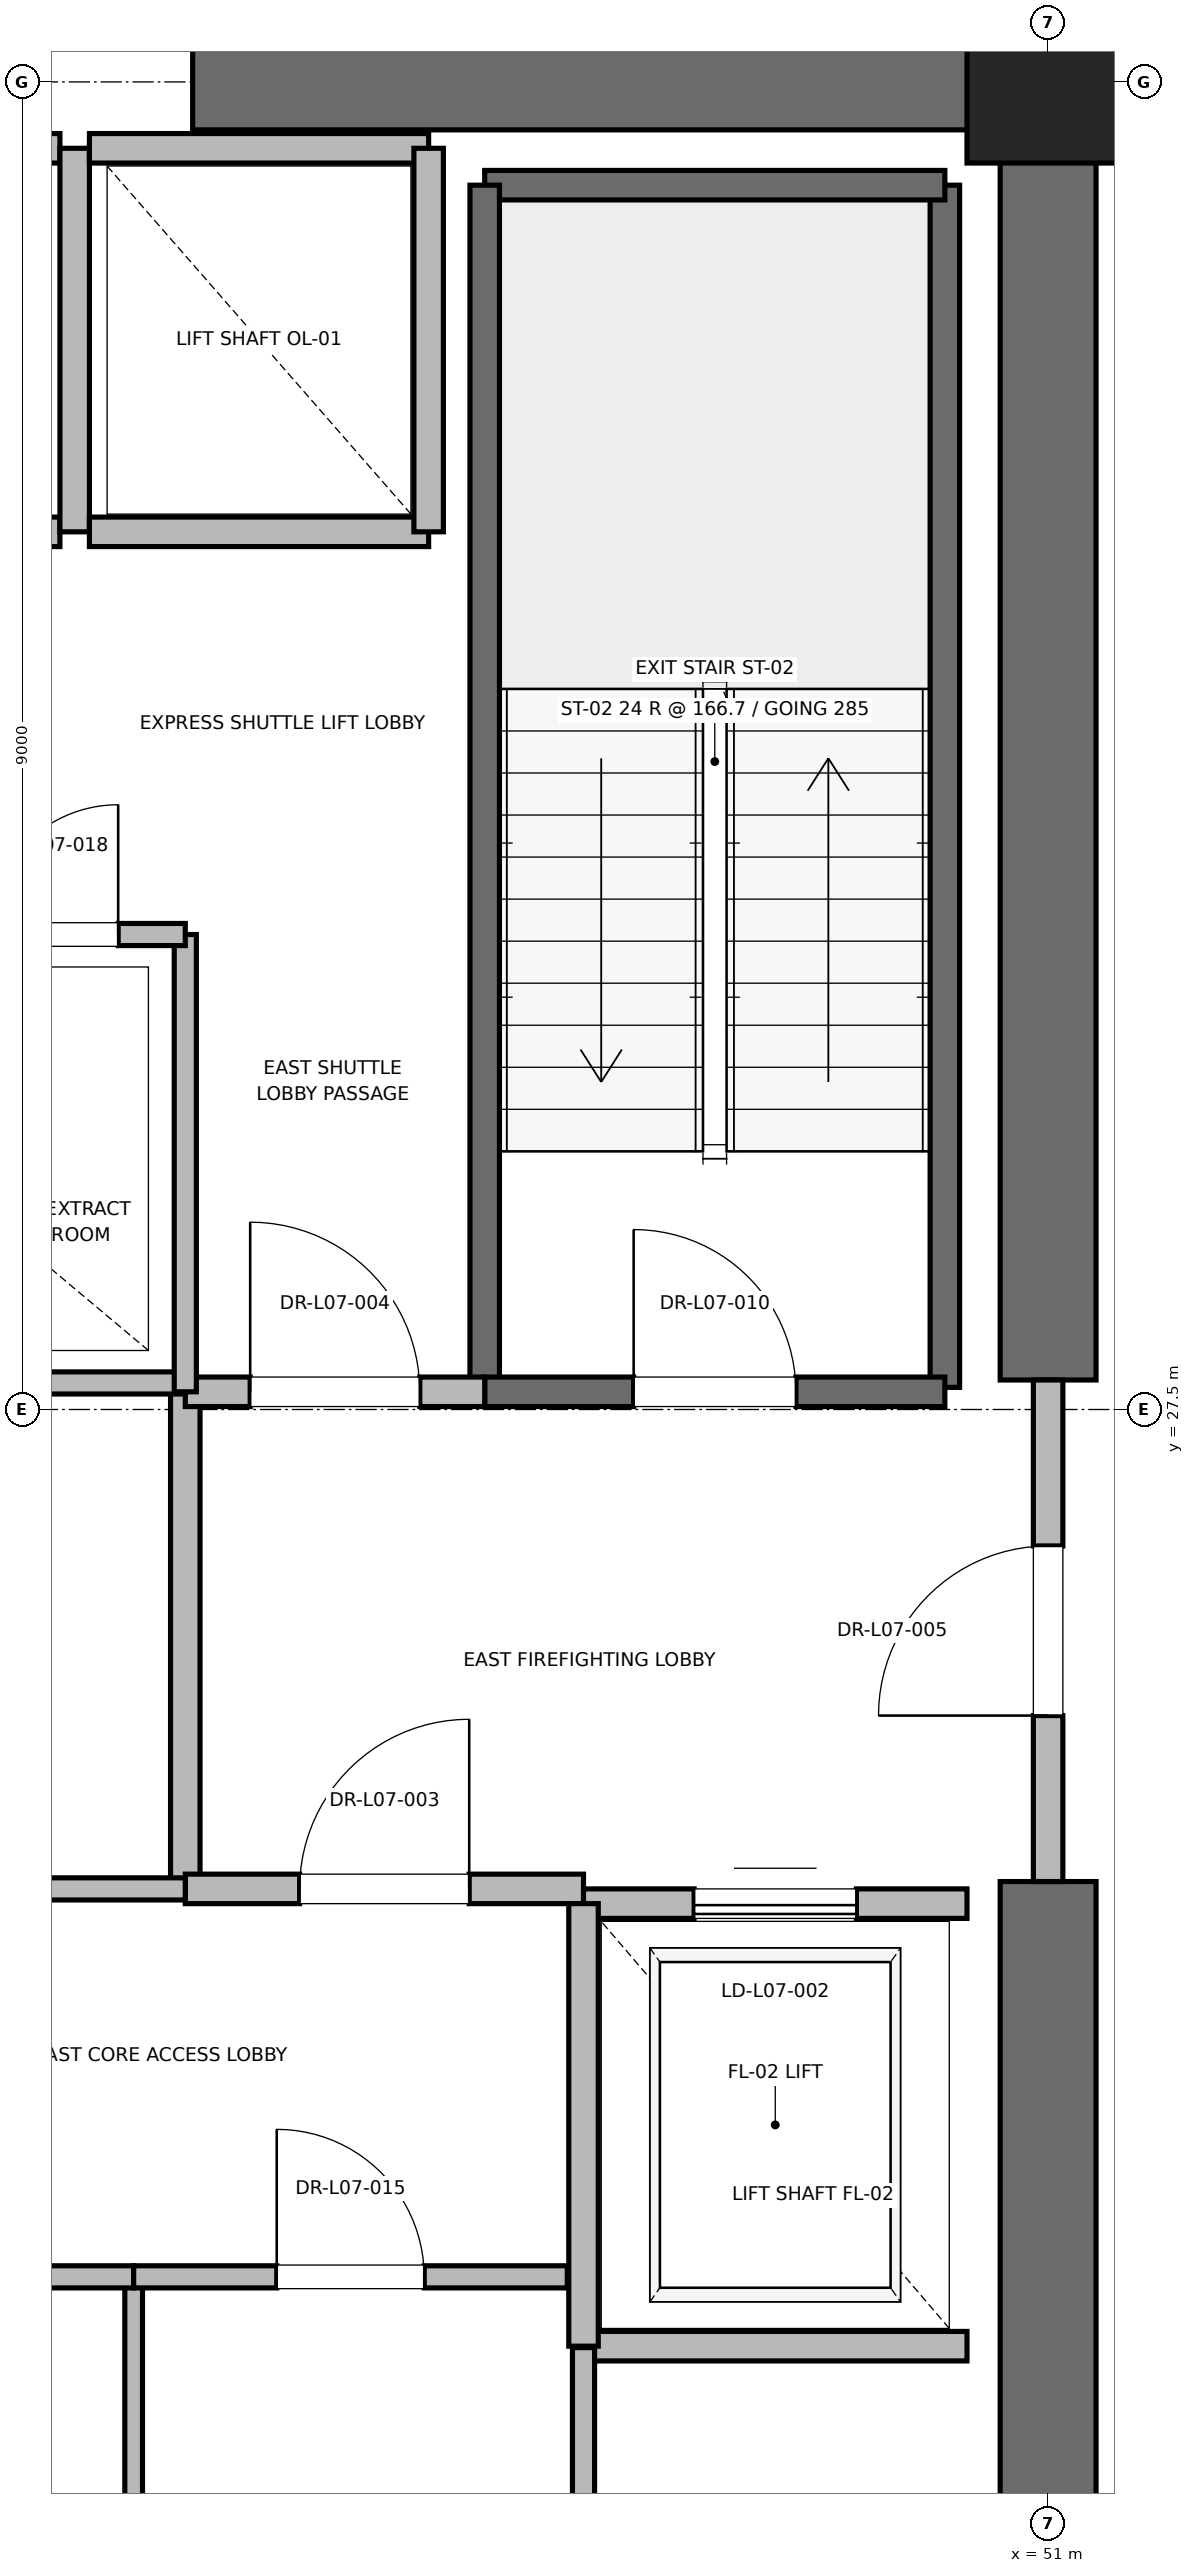
"""IFC4 building model, lengths in metres.
Left out: names, types, materials, properties, quantities, classifications, styles, units other than length and angle.
Written with IfcOpenShell. Run it as: python <this file> out.ifc"""

import sys

from ifc_helpers import new_model, si_unit, direction, frame, frame_2d, origin, origin_2d, place, context, subcontext, project, spatial, rectangle, extrude, element, fill, save


model = new_model("IFC4")
c1 = context("Model", 3, precision=1e-05, world=origin(), true_north=direction((0.0, 1.0)))
c2 = subcontext(c1, "Body", "Model", "MODEL_VIEW")
j1 = project(units=[si_unit("LENGTHUNIT", "METRE"), si_unit("PLANEANGLEUNIT", "RADIAN")], contexts=[c1])
p1 = place(None, origin())
s1 = spatial("IfcSite", under=j1, at=p1, CompositionType="ELEMENT")
p2 = place(p1, origin())
s2 = spatial("IfcBuilding", under=s1, at=p2, CompositionType="ELEMENT")
p3 = place(p2, frame((0.0, 0.0, 35.6)))
s3 = spatial("IfcBuildingStorey", under=s2, at=p3, CompositionType="ELEMENT", Elevation=35.6)
p4 = place(p3, frame((51.0, 36.5, 0.0), z_axis=(0.0, 0.0, 1.0), x_axis=(1.0, 0.0, 0.0)))
e1 = element("IfcColumn", 1, at=p4, inside=s3, PredefinedType="PILASTER", context=c2, shape_type="SweptSolid", body=[
    extrude(rectangle(XDim=1.1, YDim=1.1, at=origin_2d()), origin(), (0.0, 0.0, 1.0), 4.0),
])
for number, where, z_axis, x_axis in (
    (2, (45.2, 36.5, 0.0), (0.0, 0.0, 1.0), (1.0, 0.0, 0.0)),
    (3, (51.0, 18.5, 0.0), (0.0, 0.0, 1.0), (0.0, 1.0, 0.0)),
):
    element("IfcWall", number, at=place(p3, frame(where, z_axis=z_axis, x_axis=x_axis)), inside=s3, PredefinedType="SHEAR", context=c2, shape_type="SweptSolid", body=[
        extrude(rectangle(XDim=5.8, YDim=0.65, at=frame_2d((2.9, 0.0))), origin(), (0.0, 0.0, 1.0), 3.76),
    ])
p5 = place(p3, frame((51.0, 27.7, 0.0), z_axis=(0.0, 0.0, 1.0), x_axis=(0.0, 1.0, 0.0)))
e4 = element("IfcWall", 4, at=p5, inside=s3, PredefinedType="SHEAR", context=c2, shape_type="SweptSolid", body=[
    extrude(rectangle(XDim=8.8, YDim=0.65, at=frame_2d((4.4, 0.0))), origin(), (0.0, 0.0, 1.0), 3.76),
])
p6 = place(p3, frame((50.3, 27.65, 0.0), z_axis=(0.0, 0.0, 1.0), x_axis=(0.0, 1.0, 0.0)))
e5 = element("IfcWall", 5, at=p6, inside=s3, PredefinedType="SOLIDWALL", context=c2, shape_type="SweptSolid", body=[
    extrude(rectangle(XDim=8.15, YDim=0.2, at=frame_2d((4.075, 0.0))), origin(), (0.0, 0.0, 1.0), 3.76),
])
p7 = place(p3, frame((47.18, 35.8, 0.0), z_axis=(0.0, 0.0, 1.0), x_axis=(1.0, 0.0, 0.0)))
e6 = element("IfcWall", 6, at=p7, inside=s3, PredefinedType="SOLIDWALL", context=c2, shape_type="SweptSolid", body=[
    extrude(rectangle(XDim=3.12, YDim=0.2, at=frame_2d((1.56, 0.0))), origin(), (0.0, 0.0, 1.0), 3.76),
])
p8 = place(p3, frame((47.18, 27.62, 0.0), z_axis=(0.0, 0.0, 1.0), x_axis=(0.0, 1.0, 0.0)))
e7 = element("IfcWall", 7, at=p8, inside=s3, PredefinedType="SOLIDWALL", context=c2, shape_type="SweptSolid", body=[
    extrude(rectangle(XDim=8.18, YDim=0.2, at=frame_2d((4.09, 0.0))), origin(), (0.0, 0.0, 1.0), 3.76),
])
p9 = place(p3, frame((47.18, 27.62, 0.0), z_axis=(0.0, 0.0, 1.0), x_axis=(1.0, 0.0, 0.0)))
e8 = element("IfcWall", 8, at=p9, inside=s3, PredefinedType="SOLIDWALL", context=c2, shape_type="SweptSolid", body=[
    extrude(rectangle(XDim=3.12, YDim=0.2, at=frame_2d((1.56, 0.0))), origin(), (0.0, 0.0, 1.0), 3.76),
])
p10 = place(p9, frame((1.01, 0.0, 0.0)))
e9 = element("IfcOpeningElement", 9, at=p10, cuts=e8, PredefinedType="OPENING", context=c2, shape_type="SweptSolid", body=[
    extrude(rectangle(XDim=1.1, YDim=2.15, at=frame_2d((0.55, 1.075))), frame((0.0, 0.1, 0.0), z_axis=(0.0, -1.0, 0.0), x_axis=(1.0, 0.0, 0.0)), (0.0, 0.0, 1.0), 0.2),
])
p11 = place(p3, frame((45.15, 24.25, 0.0), z_axis=(0.0, 0.0, 1.0), x_axis=(0.0, 1.0, 0.0)))
e10 = element("IfcWall", 10, at=p11, inside=s3, PredefinedType="PARTITIONING", context=c2, shape_type="SweptSolid", body=[
    extrude(rectangle(XDim=3.37, YDim=0.2, at=frame_2d((1.685, 0.0))), origin(), (0.0, 0.0, 1.0), 3.76),
])
p12 = place(p3, frame((45.15, 24.25, 0.0), z_axis=(0.0, 0.0, 1.0), x_axis=(1.0, 0.0, 0.0)))
e11 = element("IfcWall", 11, at=p12, inside=s3, PredefinedType="PARTITIONING", context=c2, shape_type="SweptSolid", body=[
    extrude(rectangle(XDim=2.7, YDim=0.2, at=frame_2d((1.35, 0.0))), origin(), (0.0, 0.0, 1.0), 3.76),
])
p13 = place(p12, frame((0.775, 0.0, 0.0)))
e12 = element("IfcOpeningElement", 12, at=p13, cuts=e11, PredefinedType="OPENING", context=c2, shape_type="SweptSolid", body=[
    extrude(rectangle(XDim=1.15, YDim=2.2, at=frame_2d((0.575, 1.1))), frame((0.0, 0.1, 0.0), z_axis=(0.0, -1.0, 0.0), x_axis=(1.0, 0.0, 0.0)), (0.0, 0.0, 1.0), 0.2),
])
p14 = place(p3, frame((45.15, 27.62, 0.0), z_axis=(0.0, 0.0, 1.0), x_axis=(1.0, 0.0, 0.0)))
e13 = element("IfcWall", 13, at=p14, inside=s3, PredefinedType="PARTITIONING", context=c2, shape_type="SweptSolid", body=[
    extrude(rectangle(XDim=2.03, YDim=0.2, at=frame_2d((1.015, 0.0))), origin(), (0.0, 0.0, 1.0), 3.76),
])
p15 = place(p14, frame((0.44, 0.0, 0.0)))
e14 = element("IfcOpeningElement", 14, at=p15, cuts=e13, PredefinedType="OPENING", context=c2, shape_type="SweptSolid", body=[
    extrude(rectangle(XDim=1.15, YDim=2.2, at=frame_2d((0.575, 1.1))), frame((0.0, 0.1, 0.0), z_axis=(0.0, -1.0, 0.0), x_axis=(1.0, 0.0, 0.0)), (0.0, 0.0, 1.0), 0.2),
])
p16 = place(p3, frame((51.0, 24.3, 0.0), z_axis=(0.0, 0.0, 1.0), x_axis=(0.0, 1.0, 0.0)))
e15 = element("IfcWall", 15, at=p16, inside=s3, PredefinedType="PARTITIONING", context=c2, shape_type="SweptSolid", body=[
    extrude(rectangle(XDim=3.4, YDim=0.2, at=frame_2d((1.7, 0.0))), origin(), (0.0, 0.0, 1.0), 2.54),
])
p17 = place(p16, frame((1.125, 0.0, 0.0)))
e16 = element("IfcOpeningElement", 16, at=p17, cuts=e15, PredefinedType="OPENING", context=c2, shape_type="SweptSolid", body=[
    extrude(rectangle(XDim=1.15, YDim=2.2, at=frame_2d((0.575, 1.1))), frame((0.0, 0.1, 0.0), z_axis=(0.0, -1.0, 0.0), x_axis=(1.0, 0.0, 0.0)), (0.0, 0.0, 1.0), 0.2),
])
p18 = place(p3, frame((47.85, 21.15, 0.0), z_axis=(0.0, 0.0, 1.0), x_axis=(1.0, 0.0, 0.0)))
e17 = element("IfcWall", 17, at=p18, inside=s3, PredefinedType="SOLIDWALL", context=c2, shape_type="SweptSolid", body=[
    extrude(rectangle(XDim=2.6, YDim=0.2, at=frame_2d((1.3, 0.0))), origin(), (0.0, 0.0, 1.0), 3.76),
])
p19 = place(p3, frame((50.45, 24.15, 0.0), z_axis=(0.0, 0.0, 1.0), x_axis=(-1.0, 0.0, 0.0)))
e18 = element("IfcWall", 18, at=p19, inside=s3, PredefinedType="SOLIDWALL", context=c2, shape_type="SweptSolid", body=[
    extrude(rectangle(XDim=2.6, YDim=0.2, at=frame_2d((1.3, 0.0))), origin(), (0.0, 0.0, 1.0), 2.54),
])
p20 = place(p19, frame((0.75, 0.0, 0.0)))
e19 = element("IfcOpeningElement", 19, at=p20, cuts=e18, PredefinedType="OPENING", context=c2, shape_type="SweptSolid", body=[
    extrude(rectangle(XDim=1.1, YDim=2.2, at=frame_2d((0.55, 1.1))), frame((0.0, 0.1, 0.0), z_axis=(0.0, -1.0, 0.0), x_axis=(1.0, 0.0, 0.0)), (0.0, 0.0, 1.0), 0.2),
])
p21 = place(p3, frame((47.85, 24.15, 0.0), z_axis=(0.0, 0.0, 1.0), x_axis=(0.0, -1.0, 0.0)))
e20 = element("IfcWall", 20, at=p21, inside=s3, PredefinedType="SOLIDWALL", context=c2, shape_type="SweptSolid", body=[
    extrude(rectangle(XDim=3.0, YDim=0.2, at=frame_2d((1.5, 0.0))), origin(), (0.0, 0.0, 1.0), 3.76),
])
p22 = place(p3, frame((42.0, 33.45, 0.0), z_axis=(0.0, 0.0, 1.0), x_axis=(1.0, 0.0, 0.0)))
e21 = element("IfcWall", 21, at=p22, inside=s3, PredefinedType="SOLIDWALL", context=c2, shape_type="SweptSolid", body=[
    extrude(rectangle(XDim=2.3, YDim=0.2, at=frame_2d((1.15, 0.0))), origin(), (0.0, 0.0, 1.0), 3.76),
])
p23 = place(p3, frame((44.3, 36.05, 0.0), z_axis=(0.0, 0.0, 1.0), x_axis=(-1.0, 0.0, 0.0)))
e22 = element("IfcWall", 22, at=p23, inside=s3, PredefinedType="SOLIDWALL", context=c2, shape_type="SweptSolid", body=[
    extrude(rectangle(XDim=2.3, YDim=0.2, at=frame_2d((1.15, 0.0))), origin(), (0.0, 0.0, 1.0), 2.54),
])
p24 = place(p3, frame((44.4, 33.45, 0.0), z_axis=(0.0, 0.0, 1.0), x_axis=(0.0, 1.0, 0.0)))
e23 = element("IfcWall", 23, at=p24, inside=s3, PredefinedType="SOLIDWALL", context=c2, shape_type="SweptSolid", body=[
    extrude(rectangle(XDim=2.6, YDim=0.2, at=frame_2d((1.3, 0.0))), origin(), (0.0, 0.0, 1.0), 2.54),
])
p25 = place(p3, frame((44.5, 33.45, 0.0), z_axis=(0.0, 0.0, 1.0), x_axis=(1.0, 0.0, 0.0)))
e24 = element("IfcWall", 24, at=p25, inside=s3, PredefinedType="SOLIDWALL", context=c2, shape_type="SweptSolid", body=[
    extrude(rectangle(XDim=2.3, YDim=0.2, at=frame_2d((1.15, 0.0))), origin(), (0.0, 0.0, 1.0), 3.76),
])
p26 = place(p3, frame((46.8, 36.05, 0.0), z_axis=(0.0, 0.0, 1.0), x_axis=(-1.0, 0.0, 0.0)))
e25 = element("IfcWall", 25, at=p26, inside=s3, PredefinedType="SOLIDWALL", context=c2, shape_type="SweptSolid", body=[
    extrude(rectangle(XDim=2.3, YDim=0.2, at=frame_2d((1.15, 0.0))), origin(), (0.0, 0.0, 1.0), 2.54),
])
p27 = place(p3, frame((46.8, 33.45, 0.0), z_axis=(0.0, 0.0, 1.0), x_axis=(0.0, 1.0, 0.0)))
e26 = element("IfcWall", 26, at=p27, inside=s3, PredefinedType="SOLIDWALL", context=c2, shape_type="SweptSolid", body=[
    extrude(rectangle(XDim=2.6, YDim=0.2, at=frame_2d((1.3, 0.0))), origin(), (0.0, 0.0, 1.0), 3.76),
])
p28 = place(p3, frame((41.56, 27.68, 0.0), z_axis=(0.0, 0.0, 1.0), x_axis=(1.0, 0.0, 0.0)))
e27 = element("IfcWall", 27, at=p28, inside=s3, PredefinedType="PARTITIONING", context=c2, shape_type="SweptSolid", body=[
    extrude(rectangle(XDim=3.59, YDim=0.15, at=frame_2d((1.795, 0.0))), origin(), (0.0, 0.0, 1.0), 2.85),
])
p29 = place(p3, frame((47.85, 18.6, 0.0), z_axis=(0.0, 0.0, 1.0), x_axis=(0.0, 1.0, 0.0)))
e28 = element("IfcWall", 28, at=p29, inside=s3, PredefinedType="PARTITIONING", context=c2, shape_type="SweptSolid", body=[
    extrude(rectangle(XDim=2.54, YDim=0.15, at=frame_2d((1.27, 0.0))), origin(), (0.0, 0.0, 1.0), 2.85),
])
p30 = place(p3, frame((44.8, 18.6, 0.0), z_axis=(0.0, 0.0, 1.0), x_axis=(0.0, 1.0, 0.0)))
e29 = element("IfcWall", 29, at=p30, inside=s3, PredefinedType="PARTITIONING", context=c2, shape_type="SweptSolid", body=[
    extrude(rectangle(XDim=3.02, YDim=0.12, at=frame_2d((1.51, 0.0))), origin(), (0.0, 0.0, 1.0), 2.85),
])
p31 = place(p3, frame((41.76, 21.62, 0.0), z_axis=(0.0, 0.0, 1.0), x_axis=(1.0, 0.0, 0.0)))
e30 = element("IfcWall", 30, at=p31, inside=s3, PredefinedType="PARTITIONING", context=c2, shape_type="SweptSolid", body=[
    extrude(rectangle(XDim=3.04, YDim=0.15, at=frame_2d((1.52, 0.0))), origin(), (0.0, 0.0, 1.0), 2.85),
])
p32 = place(p31, frame((1.02, 0.0, 0.0)))
e31 = element("IfcOpeningElement", 31, at=p32, cuts=e30, PredefinedType="OPENING", context=c2, shape_type="SweptSolid", body=[
    extrude(rectangle(XDim=1.0, YDim=2.15, at=frame_2d((0.5, 1.075))), frame((0.0, 0.075, 0.0), z_axis=(0.0, -1.0, 0.0), x_axis=(1.0, 0.0, 0.0)), (0.0, 0.0, 1.0), 0.15),
])
p33 = place(p3, frame((44.8, 21.62, 0.0), z_axis=(0.0, 0.0, 1.0), x_axis=(1.0, 0.0, 0.0)))
e32 = element("IfcWall", 32, at=p33, inside=s3, PredefinedType="PARTITIONING", context=c2, shape_type="SweptSolid", body=[
    extrude(rectangle(XDim=2.94, YDim=0.15, at=frame_2d((1.47, 0.0))), origin(), (0.0, 0.0, 1.0), 2.85),
])
p34 = place(p33, frame((0.97, 0.0, 0.0)))
e33 = element("IfcOpeningElement", 33, at=p34, cuts=e32, PredefinedType="OPENING", context=c2, shape_type="SweptSolid", body=[
    extrude(rectangle(XDim=1.0, YDim=2.15, at=frame_2d((0.5, 1.075))), frame((0.0, 0.075, 0.0), z_axis=(0.0, -1.0, 0.0), x_axis=(1.0, 0.0, 0.0)), (0.0, 0.0, 1.0), 0.15),
])
p35 = place(p3, frame((41.76, 24.25, 0.0), z_axis=(0.0, 0.0, 1.0), x_axis=(1.0, 0.0, 0.0)))
e34 = element("IfcWall", 34, at=p35, inside=s3, PredefinedType="PARTITIONING", context=c2, shape_type="SweptSolid", body=[
    extrude(rectangle(XDim=3.39, YDim=0.15, at=frame_2d((1.695, 0.0))), origin(), (0.0, 0.0, 1.0), 2.85),
])
p36 = place(p35, frame((1.255, 0.0, 0.0)))
e35 = element("IfcOpeningElement", 35, at=p36, cuts=e34, PredefinedType="OPENING", context=c2, shape_type="SweptSolid", body=[
    extrude(rectangle(XDim=0.88, YDim=2.1, at=frame_2d((0.44, 1.05))), frame((0.0, 0.075, 0.0), z_axis=(0.0, -1.0, 0.0), x_axis=(1.0, 0.0, 0.0)), (0.0, 0.0, 1.0), 0.15),
])
p37 = place(p3, frame((45.15, 27.62, 0.0), z_axis=(0.0, 0.0, 1.0), x_axis=(0.0, 1.0, 0.0)))
e36 = element("IfcWall", 36, at=p37, inside=s3, PredefinedType="PARTITIONING", context=c2, shape_type="SweptSolid", body=[
    extrude(rectangle(XDim=3.1, YDim=0.15, at=frame_2d((1.55, 0.0))), origin(), (0.0, 0.0, 1.0), 2.85),
])
p38 = place(p3, frame((43.36, 30.72, 0.0), z_axis=(0.0, 0.0, 1.0), x_axis=(1.0, 0.0, 0.0)))
e37 = element("IfcWall", 37, at=p38, inside=s3, PredefinedType="PARTITIONING", context=c2, shape_type="SweptSolid", body=[
    extrude(rectangle(XDim=1.79, YDim=0.15, at=frame_2d((0.895, 0.0))), origin(), (0.0, 0.0, 1.0), 2.85),
])
p39 = place(p38, frame((0.455, 0.0, 0.0)))
e38 = element("IfcOpeningElement", 38, at=p39, cuts=e37, PredefinedType="OPENING", context=c2, shape_type="SweptSolid", body=[
    extrude(rectangle(XDim=0.88, YDim=2.1, at=frame_2d((0.44, 1.05))), frame((0.0, 0.075, 0.0), z_axis=(0.0, -1.0, 0.0), x_axis=(1.0, 0.0, 0.0)), (0.0, 0.0, 1.0), 0.15),
])
p40 = place(p10, origin())
e39 = element("IfcDoor", 39, at=p40, inside=s3, OperationType="SINGLE_SWING_LEFT", PredefinedType="DOOR", context=c2, shape_type="SweptSolid", body=[
    extrude(rectangle(XDim=1.1, YDim=2.15, at=frame_2d((0.55, 1.075))), frame((0.0, 0.025, 0.0), z_axis=(0.0, -1.0, 0.0), x_axis=(1.0, 0.0, 0.0)), (0.0, 0.0, 1.0), 0.05),
])
fill(e9, e39)
p41 = place(p13, origin())
e40 = element("IfcDoor", 40, at=p41, inside=s3, OperationType="SINGLE_SWING_RIGHT", PredefinedType="DOOR", context=c2, shape_type="SweptSolid", body=[
    extrude(rectangle(XDim=1.15, YDim=2.2, at=frame_2d((0.575, 1.1))), frame((0.0, 0.025, 0.0), z_axis=(0.0, -1.0, 0.0), x_axis=(1.0, 0.0, 0.0)), (0.0, 0.0, 1.0), 0.05),
])
fill(e12, e40)
p42 = place(p15, origin())
e41 = element("IfcDoor", 41, at=p42, inside=s3, OperationType="SINGLE_SWING_LEFT", PredefinedType="DOOR", context=c2, shape_type="SweptSolid", body=[
    extrude(rectangle(XDim=1.15, YDim=2.2, at=frame_2d((0.575, 1.1))), frame((0.0, 0.025, 0.0), z_axis=(0.0, -1.0, 0.0), x_axis=(1.0, 0.0, 0.0)), (0.0, 0.0, 1.0), 0.05),
])
fill(e14, e41)
p43 = place(p17, origin())
e42 = element("IfcDoor", 42, at=p43, inside=s3, OperationType="SINGLE_SWING_LEFT", PredefinedType="DOOR", context=c2, shape_type="SweptSolid", body=[
    extrude(rectangle(XDim=1.15, YDim=2.2, at=frame_2d((0.575, 1.1))), frame((0.0, 0.025, 0.0), z_axis=(0.0, -1.0, 0.0), x_axis=(1.0, 0.0, 0.0)), (0.0, 0.0, 1.0), 0.05),
])
fill(e16, e42)
p44 = place(p20, origin())
e43 = element("IfcDoor", 43, at=p44, inside=s3, OperationType="SLIDING_TO_RIGHT", PredefinedType="DOOR", context=c2, shape_type="SweptSolid", body=[
    extrude(rectangle(XDim=1.1, YDim=2.2, at=frame_2d((0.55, 1.1))), frame((0.0, 0.025, 0.0), z_axis=(0.0, -1.0, 0.0), x_axis=(1.0, 0.0, 0.0)), (0.0, 0.0, 1.0), 0.05),
])
fill(e19, e43)
p45 = place(p34, origin())
e44 = element("IfcDoor", 44, at=p45, inside=s3, OperationType="SINGLE_SWING_LEFT", PredefinedType="DOOR", context=c2, shape_type="SweptSolid", body=[
    extrude(rectangle(XDim=1.0, YDim=2.15, at=frame_2d((0.5, 1.075))), frame((0.0, 0.025, 0.0), z_axis=(0.0, -1.0, 0.0), x_axis=(1.0, 0.0, 0.0)), (0.0, 0.0, 1.0), 0.05),
])
fill(e33, e44)
p46 = place(p39, origin())
e45 = element("IfcDoor", 45, at=p46, inside=s3, OperationType="SINGLE_SWING_RIGHT", PredefinedType="DOOR", context=c2, shape_type="SweptSolid", body=[
    extrude(rectangle(XDim=0.88, YDim=2.1, at=frame_2d((0.44, 1.05))), frame((0.0, 0.025, 0.0), z_axis=(0.0, -1.0, 0.0), x_axis=(1.0, 0.0, 0.0)), (0.0, 0.0, 1.0), 0.05),
])
fill(e38, e45)
save(model, sys.argv[1])
